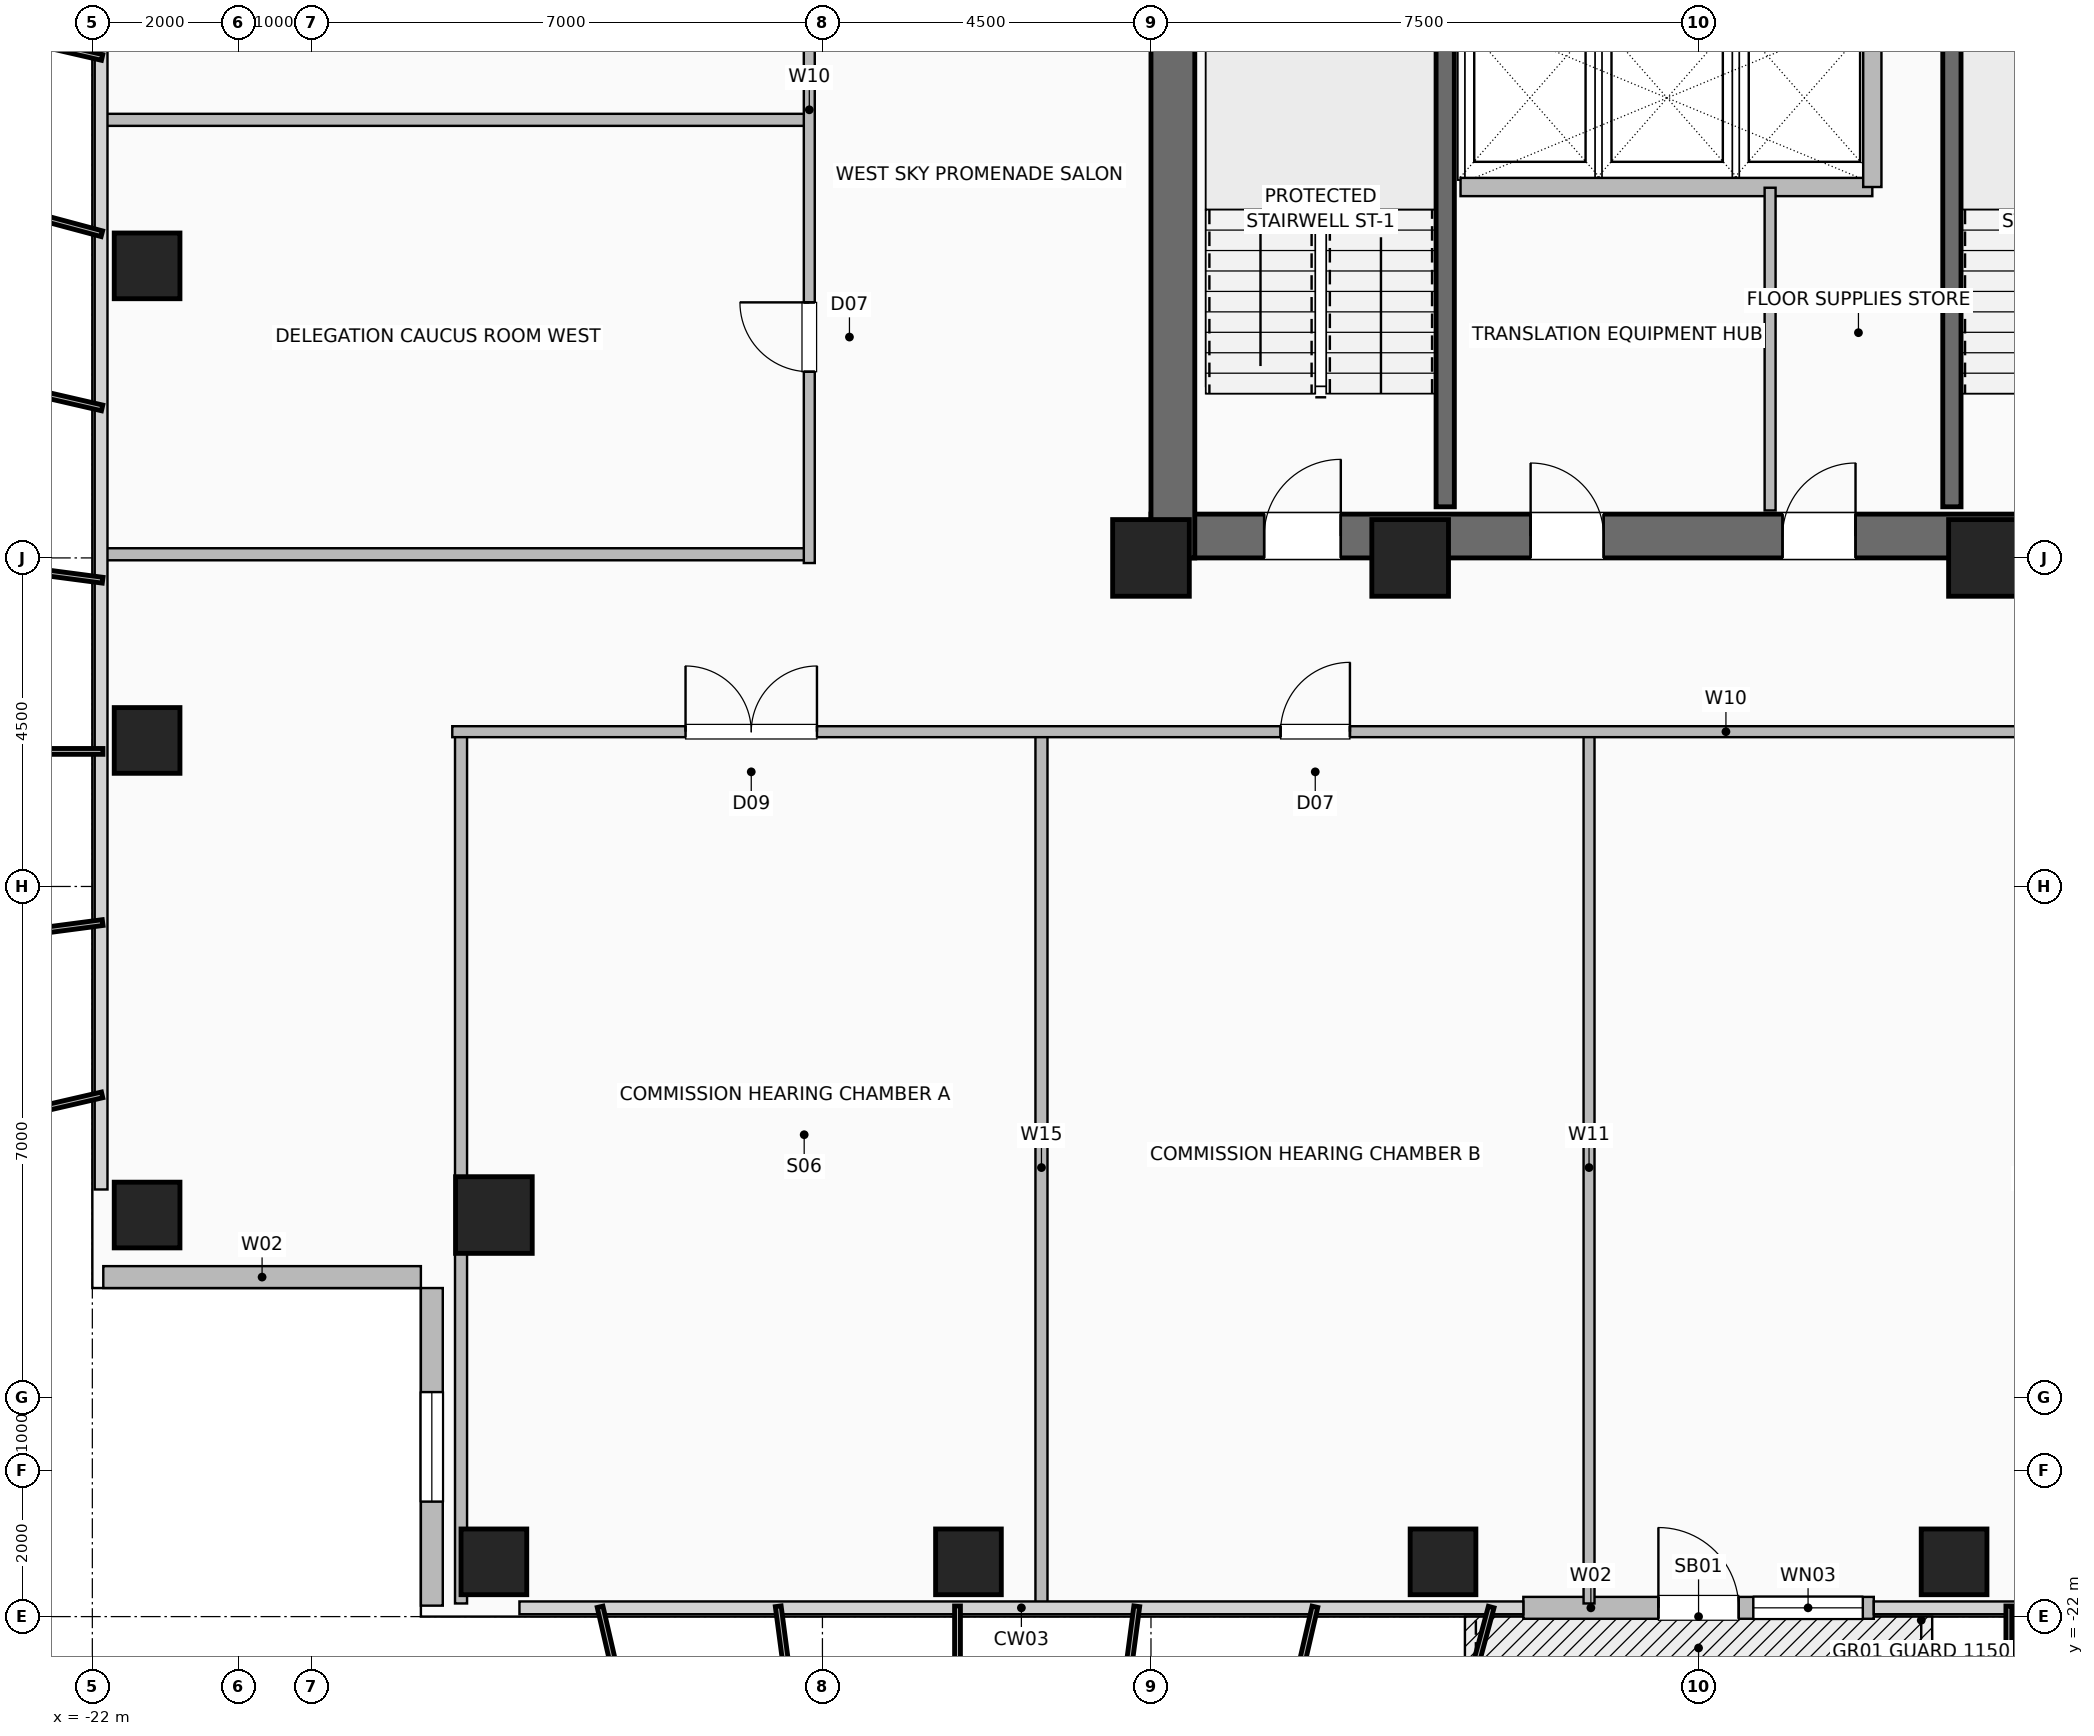
"""IFC4 building model, lengths in metres.
Left out: names, types, materials, properties, quantities, classifications, styles, units other than length and angle.
Written with IfcOpenShell. Run it as: python <this file> out.ifc"""

import sys

from ifc_helpers import new_model, si_unit, direction, frame, frame_2d, origin, origin_2d, place, context, subcontext, project, spatial, rectangle, hollow_rectangle, extrude, element, fill, save


model = new_model("IFC4")
c1 = context("Model", 3, precision=1e-05, world=origin(), true_north=direction((0.0, 1.0)))
c2 = subcontext(c1, "Body", "Model", "MODEL_VIEW")
j1 = project(units=[si_unit("LENGTHUNIT", "METRE"), si_unit("PLANEANGLEUNIT", "RADIAN")], contexts=[c1])
p1 = place(None, origin())
s1 = spatial("IfcSite", under=j1, at=p1, CompositionType="ELEMENT")
p2 = place(p1, origin())
s2 = spatial("IfcBuilding", under=s1, at=p2, CompositionType="ELEMENT")
p3 = place(p2, frame((0.0, 0.0, 104.8)))
s3 = spatial("IfcBuildingStorey", under=s2, at=p3, CompositionType="ELEMENT", Elevation=104.8)
for number, where, z_axis, x_axis in (
    (1, (-7.5, -7.5, 0.0), (0.0, 0.0, 1.0), (1.0, 0.0, 0.0)),
    (2, (-3.95, -7.5, 0.0), (0.0, 0.0, 1.0), (1.0, 0.0, 0.0)),
    (3, (3.95, -7.5, 0.0), (0.0, 0.0, 1.0), (1.0, 0.0, 0.0)),
):
    element("IfcColumn", number, at=place(p3, frame(where, z_axis=z_axis, x_axis=x_axis)), inside=s3, PredefinedType="COLUMN", context=c2, shape_type="SweptSolid", body=[
        extrude(hollow_rectangle(XDim=1.05, YDim=1.05, WallThickness=0.05, at=origin_2d()), origin(), (0.0, 0.0, 1.0), 3.6),
    ])
for number, where, z_axis, x_axis in (
    (4, (-16.5, -21.25, 0.0), (0.0, 0.0, 1.0), (1.0, 0.0, 0.0)),
    (5, (-21.25, -16.5, 0.0), (0.0, 0.0, 1.0), (1.0, 0.0, 0.0)),
    (6, (-10.0, -21.25, 0.0), (0.0, 0.0, 1.0), (1.0, 0.0, 0.0)),
    (7, (-21.25, -10.0, 0.0), (0.0, 0.0, 1.0), (1.0, 0.0, 0.0)),
    (8, (-3.5, -21.25, 0.0), (0.0, 0.0, 1.0), (1.0, 0.0, 0.0)),
    (9, (-21.25, -3.5, 0.0), (0.0, 0.0, 1.0), (1.0, 0.0, 0.0)),
    (10, (3.5, -21.25, 0.0), (0.0, 0.0, 1.0), (1.0, 0.0, 0.0)),
):
    element("IfcColumn", number, at=place(p3, frame(where, z_axis=z_axis, x_axis=x_axis)), inside=s3, PredefinedType="COLUMN", context=c2, shape_type="SweptSolid", body=[
        extrude(hollow_rectangle(XDim=0.9, YDim=0.9, WallThickness=0.045, at=origin_2d()), origin(), (0.0, 0.0, 1.0), 3.6),
    ])
p4 = place(p3, frame((-16.5, -16.5, 0.0), z_axis=(0.0, 0.0, 1.0), x_axis=(1.0, 0.0, 0.0)))
e11 = element("IfcColumn", 11, at=p4, inside=s3, PredefinedType="COLUMN", context=c2, shape_type="SweptSolid", body=[
    extrude(hollow_rectangle(XDim=1.05, YDim=1.05, WallThickness=0.05, at=origin_2d()), origin(), (0.0, 0.0, 1.0), 3.6),
])
p5 = place(p3, frame((-2.4, -21.88, 0.0), z_axis=(0.0, 0.0, 1.0), x_axis=(1.0, 0.0, 0.0)))
e12 = element("IfcWall", 12, at=p5, inside=s3, PredefinedType="SOLIDWALL", context=c2, shape_type="SweptSolid", body=[
    extrude(rectangle(XDim=4.8, YDim=0.3, at=frame_2d((2.4, 0.0))), origin(), (0.0, 0.0, 1.0), 3.36),
])
p6 = place(p5, frame((1.85, 0.0, 0.0)))
e13 = element("IfcOpeningElement", 13, at=p6, cuts=e12, PredefinedType="OPENING", context=c2, shape_type="SweptSolid", body=[
    extrude(rectangle(XDim=1.1, YDim=2.2, at=frame_2d((0.55, 1.1))), frame((0.0, 0.16, 0.0), z_axis=(0.0, -1.0, 0.0), x_axis=(1.0, 0.0, 0.0)), (0.0, 0.0, 1.0), 0.32),
])
p7 = place(p5, frame((3.15, 0.0, 0.85)))
e14 = element("IfcOpeningElement", 14, at=p7, cuts=e12, PredefinedType="OPENING", context=c2, shape_type="SweptSolid", body=[
    extrude(rectangle(XDim=1.5, YDim=1.8, at=frame_2d((0.75, 0.9))), frame((0.0, 0.16, 0.0), z_axis=(0.0, -1.0, 0.0), x_axis=(1.0, 0.0, 0.0)), (0.0, 0.0, 1.0), 0.32),
])
p8 = place(p3, frame((-17.35, -21.85, 0.0), z_axis=(0.0, 0.0, 1.0), x_axis=(0.0, 1.0, 0.0)))
e15 = element("IfcWall", 15, at=p8, inside=s3, PredefinedType="SOLIDWALL", context=c2, shape_type="SweptSolid", body=[
    extrude(rectangle(XDim=4.35, YDim=0.3, at=frame_2d((2.175, 0.0))), origin(), (0.0, 0.0, 1.0), 3.36),
])
p9 = place(p8, frame((1.425, 0.0, 0.9)))
e16 = element("IfcOpeningElement", 16, at=p9, cuts=e15, PredefinedType="OPENING", context=c2, shape_type="SweptSolid", body=[
    extrude(rectangle(XDim=1.5, YDim=1.8, at=frame_2d((0.75, 0.9))), frame((0.0, 0.16, 0.0), z_axis=(0.0, -1.0, 0.0), x_axis=(1.0, 0.0, 0.0)), (0.0, 0.0, 1.0), 0.32),
])
p10 = place(p3, frame((-21.85, -17.35, 0.0), z_axis=(0.0, 0.0, 1.0), x_axis=(1.0, 0.0, 0.0)))
e17 = element("IfcWall", 17, at=p10, inside=s3, PredefinedType="SOLIDWALL", context=c2, shape_type="SweptSolid", body=[
    extrude(rectangle(XDim=4.35, YDim=0.3, at=frame_2d((2.175, 0.0))), origin(), (0.0, 0.0, 1.0), 3.36),
])
p11 = place(p3, frame((-7.5, -7.2, 0.0), z_axis=(0.0, 0.0, 1.0), x_axis=(1.0, 0.0, 0.0)))
e18 = element("IfcWall", 18, at=p11, inside=s3, PredefinedType="SHEAR", context=c2, shape_type="SweptSolid", body=[
    extrude(rectangle(XDim=15.0, YDim=0.6, at=frame_2d((7.5, 0.0))), origin(), (0.0, 0.0, 1.0), 3.36),
])
p12 = place(p11, frame((1.55, 0.0, 0.0)))
e19 = element("IfcOpeningElement", 19, at=p12, cuts=e18, PredefinedType="OPENING", context=c2, shape_type="SweptSolid", body=[
    extrude(rectangle(XDim=1.05, YDim=2.08, at=frame_2d((0.525, 1.04))), frame((0.0, 0.31, 0.0), z_axis=(0.0, -1.0, 0.0), x_axis=(1.0, 0.0, 0.0)), (0.0, 0.0, 1.0), 0.62),
])
p13 = place(p11, frame((12.4, 0.0, 0.0)))
e20 = element("IfcOpeningElement", 20, at=p13, cuts=e18, PredefinedType="OPENING", context=c2, shape_type="SweptSolid", body=[
    extrude(rectangle(XDim=1.05, YDim=2.08, at=frame_2d((0.525, 1.04))), frame((0.0, 0.31, 0.0), z_axis=(0.0, -1.0, 0.0), x_axis=(1.0, 0.0, 0.0)), (0.0, 0.0, 1.0), 0.62),
])
p14 = place(p11, frame((5.2, 0.0, 0.0)))
e21 = element("IfcOpeningElement", 21, at=p14, cuts=e18, PredefinedType="OPENING", context=c2, shape_type="SweptSolid", body=[
    extrude(rectangle(XDim=1.0, YDim=2.08, at=frame_2d((0.5, 1.04))), frame((0.0, 0.31, 0.0), z_axis=(0.0, -1.0, 0.0), x_axis=(1.0, 0.0, 0.0)), (0.0, 0.0, 1.0), 0.62),
])
p15 = place(p11, frame((8.65, 0.0, 0.0)))
e22 = element("IfcOpeningElement", 22, at=p15, cuts=e18, PredefinedType="OPENING", context=c2, shape_type="SweptSolid", body=[
    extrude(rectangle(XDim=1.0, YDim=2.08, at=frame_2d((0.5, 1.04))), frame((0.0, 0.31, 0.0), z_axis=(0.0, -1.0, 0.0), x_axis=(1.0, 0.0, 0.0)), (0.0, 0.0, 1.0), 0.62),
])
p16 = place(p3, frame((-7.2, -7.5, 0.0), z_axis=(0.0, 0.0, 1.0), x_axis=(0.0, 1.0, 0.0)))
e23 = element("IfcWall", 23, at=p16, inside=s3, PredefinedType="SHEAR", context=c2, shape_type="SweptSolid", body=[
    extrude(rectangle(XDim=15.0, YDim=0.6, at=frame_2d((7.5, 0.0))), origin(), (0.0, 0.0, 1.0), 3.36),
])
p17 = place(p16, frame((9.5, 0.0, 0.0)))
e24 = element("IfcOpeningElement", 24, at=p17, cuts=e23, PredefinedType="OPENING", context=c2, shape_type="SweptSolid", body=[
    extrude(rectangle(XDim=1.0, YDim=2.08, at=frame_2d((0.5, 1.04))), frame((0.0, 0.31, 0.0), z_axis=(0.0, -1.0, 0.0), x_axis=(1.0, 0.0, 0.0)), (0.0, 0.0, 1.0), 0.62),
])
for number, where, z_axis, x_axis in (
    (25, (-3.47, -6.8, 0.0), (0.0, 0.0, 1.0), (0.0, 1.0, 0.0)),
    (26, (3.47, -6.8, 0.0), (0.0, 0.0, 1.0), (0.0, 1.0, 0.0)),
):
    element("IfcWall", number, at=place(p3, frame(where, z_axis=z_axis, x_axis=x_axis)), inside=s3, PredefinedType="SHEAR", context=c2, shape_type="SweptSolid", body=[
        extrude(rectangle(XDim=7.72, YDim=0.25, at=frame_2d((3.86, 0.0))), origin(), (0.0, 0.0, 1.0), 3.36),
    ])
p18 = place(p3, frame((-3.26, -2.42, 0.0), z_axis=(0.0, 0.0, 1.0), x_axis=(1.0, 0.0, 0.0)))
e27 = element("IfcWall", 27, at=p18, inside=s3, PredefinedType="SHEAR", context=c2, shape_type="SweptSolid", body=[
    extrude(rectangle(XDim=5.64, YDim=0.25, at=frame_2d((2.82, 0.0))), origin(), (0.0, 0.0, 1.0), 3.36),
])
p19 = place(p3, frame((2.38, -2.42, 0.0), z_axis=(0.0, 0.0, 1.0), x_axis=(0.0, 1.0, 0.0)))
e28 = element("IfcWall", 28, at=p19, inside=s3, PredefinedType="SHEAR", context=c2, shape_type="SweptSolid", body=[
    extrude(rectangle(XDim=2.44, YDim=0.25, at=frame_2d((1.22, 0.0))), origin(), (0.0, 0.0, 1.0), 3.36),
])
p20 = place(p3, frame((0.98, -6.85, 0.0), z_axis=(0.0, 0.0, 1.0), x_axis=(0.0, 1.0, 0.0)))
e29 = element("IfcWall", 29, at=p20, inside=s3, PredefinedType="PARTITIONING", context=c2, shape_type="SweptSolid", body=[
    extrude(rectangle(XDim=4.42, YDim=0.15, at=frame_2d((2.21, 0.0))), origin(), (0.0, 0.0, 1.0), 3.36),
])
for number, where, z_axis, x_axis in (
    (30, (-16.95, -21.82, 0.0), (0.0, 0.0, 1.0), (0.0, 1.0, 0.0)),
    (31, (-9.0, -21.82, 0.0), (0.0, 0.0, 1.0), (0.0, 1.0, 0.0)),
):
    element("IfcWall", number, at=place(p3, frame(where, z_axis=z_axis, x_axis=x_axis)), inside=s3, PredefinedType="PLUMBINGWALL", context=c2, shape_type="SweptSolid", body=[
        extrude(rectangle(XDim=11.94, YDim=0.165, at=frame_2d((5.97, 0.0))), origin(), (0.0, 0.0, 1.0), 3.36),
    ])
p21 = place(p3, frame((-1.5, -21.82, 0.0), z_axis=(0.0, 0.0, 1.0), x_axis=(0.0, 1.0, 0.0)))
e32 = element("IfcWall", 32, at=p21, inside=s3, PredefinedType="PARTITIONING", context=c2, shape_type="SweptSolid", body=[
    extrude(rectangle(XDim=11.94, YDim=0.15, at=frame_2d((5.97, 0.0))), origin(), (0.0, 0.0, 1.0), 3.36),
])
p22 = place(p3, frame((-17.07, -9.88, 0.0), z_axis=(0.0, 0.0, 1.0), x_axis=(1.0, 0.0, 0.0)))
e33 = element("IfcWall", 33, at=p22, inside=s3, PredefinedType="PARTITIONING", context=c2, shape_type="SweptSolid", body=[
    extrude(rectangle(XDim=34.14, YDim=0.15, at=frame_2d((17.07, 0.0))), origin(), (0.0, 0.0, 1.0), 3.36),
])
p23 = place(p22, frame((3.195, 0.0, 0.0)))
e34 = element("IfcOpeningElement", 34, at=p23, cuts=e33, PredefinedType="OPENING", context=c2, shape_type="SweptSolid", body=[
    extrude(rectangle(XDim=1.8, YDim=2.08, at=frame_2d((0.9, 1.04))), frame((0.0, 0.085, 0.0), z_axis=(0.0, -1.0, 0.0), x_axis=(1.0, 0.0, 0.0)), (0.0, 0.0, 1.0), 0.17),
])
p24 = place(p22, frame((11.345, 0.0, 0.0)))
e35 = element("IfcOpeningElement", 35, at=p24, cuts=e33, PredefinedType="OPENING", context=c2, shape_type="SweptSolid", body=[
    extrude(rectangle(XDim=0.95, YDim=2.06, at=frame_2d((0.475, 1.03))), frame((0.0, 0.085, 0.0), z_axis=(0.0, -1.0, 0.0), x_axis=(1.0, 0.0, 0.0)), (0.0, 0.0, 1.0), 0.17),
])
p25 = place(p22, frame((22.595, 0.0, 0.0)))
e36 = element("IfcOpeningElement", 36, at=p25, cuts=e33, PredefinedType="OPENING", context=c2, shape_type="SweptSolid", body=[
    extrude(rectangle(XDim=0.95, YDim=2.06, at=frame_2d((0.475, 1.03))), frame((0.0, 0.085, 0.0), z_axis=(0.0, -1.0, 0.0), x_axis=(1.0, 0.0, 0.0)), (0.0, 0.0, 1.0), 0.17),
])
p26 = place(p22, frame((30.925, 0.0, 0.0)))
e37 = element("IfcOpeningElement", 37, at=p26, cuts=e33, PredefinedType="OPENING", context=c2, shape_type="SweptSolid", body=[
    extrude(rectangle(XDim=0.85, YDim=2.05, at=frame_2d((0.425, 1.025))), frame((0.0, 0.085, 0.0), z_axis=(0.0, -1.0, 0.0), x_axis=(1.0, 0.0, 0.0)), (0.0, 0.0, 1.0), 0.17),
])
p27 = place(p22, frame((32.6, 0.0, 0.0)))
e38 = element("IfcOpeningElement", 38, at=p27, cuts=e33, PredefinedType="OPENING", context=c2, shape_type="SweptSolid", body=[
    extrude(rectangle(XDim=0.95, YDim=2.06, at=frame_2d((0.475, 1.03))), frame((0.0, 0.085, 0.0), z_axis=(0.0, -1.0, 0.0), x_axis=(1.0, 0.0, 0.0)), (0.0, 0.0, 1.0), 0.17),
])
for number, where, z_axis, x_axis in (
    (39, (-21.82, -7.45, 0.0), (0.0, 0.0, 1.0), (1.0, 0.0, 0.0)),
    (40, (-21.82, -1.5, 0.0), (0.0, 0.0, 1.0), (1.0, 0.0, 0.0)),
):
    element("IfcWall", number, at=place(p3, frame(where, z_axis=z_axis, x_axis=x_axis)), inside=s3, PredefinedType="PLUMBINGWALL", context=c2, shape_type="SweptSolid", body=[
        extrude(rectangle(XDim=9.64, YDim=0.165, at=frame_2d((4.82, 0.0))), origin(), (0.0, 0.0, 1.0), 3.36),
    ])
p28 = place(p3, frame((-12.18, -7.57, 0.0), z_axis=(0.0, 0.0, 1.0), x_axis=(0.0, 1.0, 0.0)))
e41 = element("IfcWall", 41, at=p28, inside=s3, PredefinedType="PARTITIONING", context=c2, shape_type="SweptSolid", body=[
    extrude(rectangle(XDim=15.14, YDim=0.15, at=frame_2d((7.57, 0.0))), origin(), (0.0, 0.0, 1.0), 3.36),
])
p29 = place(p28, frame((2.62, 0.0, 0.0)))
e42 = element("IfcOpeningElement", 42, at=p29, cuts=e41, PredefinedType="OPENING", context=c2, shape_type="SweptSolid", body=[
    extrude(rectangle(XDim=0.95, YDim=2.06, at=frame_2d((0.475, 1.03))), frame((0.0, 0.085, 0.0), z_axis=(0.0, -1.0, 0.0), x_axis=(1.0, 0.0, 0.0)), (0.0, 0.0, 1.0), 0.17),
])
p30 = place(p28, frame((8.845, 0.0, 0.0)))
e43 = element("IfcOpeningElement", 43, at=p30, cuts=e41, PredefinedType="OPENING", context=c2, shape_type="SweptSolid", body=[
    extrude(rectangle(XDim=0.95, YDim=2.06, at=frame_2d((0.475, 1.03))), frame((0.0, 0.085, 0.0), z_axis=(0.0, -1.0, 0.0), x_axis=(1.0, 0.0, 0.0)), (0.0, 0.0, 1.0), 0.17),
])
p31 = place(p28, frame((13.37, 0.0, 0.0)))
e44 = element("IfcOpeningElement", 44, at=p31, cuts=e41, PredefinedType="OPENING", context=c2, shape_type="SweptSolid", body=[
    extrude(rectangle(XDim=0.85, YDim=2.05, at=frame_2d((0.425, 1.025))), frame((0.0, 0.085, 0.0), z_axis=(0.0, -1.0, 0.0), x_axis=(1.0, 0.0, 0.0)), (0.0, 0.0, 1.0), 0.17),
])
p32 = place(p6, origin())
e45 = element("IfcDoor", 45, at=p32, inside=s3, OperationType="SINGLE_SWING_LEFT", PredefinedType="DOOR", context=c2, shape_type="SweptSolid", body=[
    extrude(rectangle(XDim=1.1, YDim=2.2, at=frame_2d((0.55, 1.1))), frame((0.0, 0.025, 0.0), z_axis=(0.0, -1.0, 0.0), x_axis=(1.0, 0.0, 0.0)), (0.0, 0.0, 1.0), 0.05),
])
fill(e13, e45)
p33 = place(p7, origin())
e46 = element("IfcWindow", 46, at=p33, inside=s3, PartitioningType="SINGLE_PANEL", PredefinedType="WINDOW", context=c2, shape_type="SweptSolid", body=[
    extrude(rectangle(XDim=1.5, YDim=1.8, at=frame_2d((0.75, 0.9))), frame((0.0, 0.03, 0.0), z_axis=(0.0, -1.0, 0.0), x_axis=(1.0, 0.0, 0.0)), (0.0, 0.0, 1.0), 0.06),
])
fill(e14, e46)
p34 = place(p9, origin())
e47 = element("IfcWindow", 47, at=p34, inside=s3, PartitioningType="SINGLE_PANEL", PredefinedType="WINDOW", context=c2, shape_type="SweptSolid", body=[
    extrude(rectangle(XDim=1.5, YDim=1.8, at=frame_2d((0.75, 0.9))), frame((0.0, 0.03, 0.0), z_axis=(0.0, -1.0, 0.0), x_axis=(1.0, 0.0, 0.0)), (0.0, 0.0, 1.0), 0.06),
])
fill(e16, e47)
p35 = place(p12, origin())
e48 = element("IfcDoor", 48, at=p35, inside=s3, OperationType="SINGLE_SWING_RIGHT", PredefinedType="DOOR", context=c2, shape_type="SweptSolid", body=[
    extrude(rectangle(XDim=1.05, YDim=2.08, at=frame_2d((0.525, 1.04))), frame((0.0, 0.025, 0.0), z_axis=(0.0, -1.0, 0.0), x_axis=(1.0, 0.0, 0.0)), (0.0, 0.0, 1.0), 0.05),
])
fill(e19, e48)
p36 = place(p14, origin())
e49 = element("IfcDoor", 49, at=p36, inside=s3, OperationType="SINGLE_SWING_LEFT", PredefinedType="DOOR", context=c2, shape_type="SweptSolid", body=[
    extrude(rectangle(XDim=1.0, YDim=2.08, at=frame_2d((0.5, 1.04))), frame((0.0, 0.025, 0.0), z_axis=(0.0, -1.0, 0.0), x_axis=(1.0, 0.0, 0.0)), (0.0, 0.0, 1.0), 0.05),
])
fill(e21, e49)
p37 = place(p15, origin())
e50 = element("IfcDoor", 50, at=p37, inside=s3, OperationType="SINGLE_SWING_RIGHT", PredefinedType="DOOR", context=c2, shape_type="SweptSolid", body=[
    extrude(rectangle(XDim=1.0, YDim=2.08, at=frame_2d((0.5, 1.04))), frame((0.0, 0.025, 0.0), z_axis=(0.0, -1.0, 0.0), x_axis=(1.0, 0.0, 0.0)), (0.0, 0.0, 1.0), 0.05),
])
fill(e22, e50)
p38 = place(p23, origin())
e51 = element("IfcDoor", 51, at=p38, inside=s3, OperationType="DOUBLE_DOOR_SINGLE_SWING", PredefinedType="DOOR", context=c2, shape_type="SweptSolid", body=[
    extrude(rectangle(XDim=1.8, YDim=2.08, at=frame_2d((0.9, 1.04))), frame((0.0, 0.025, 0.0), z_axis=(0.0, -1.0, 0.0), x_axis=(1.0, 0.0, 0.0)), (0.0, 0.0, 1.0), 0.05),
])
fill(e34, e51)
p39 = place(p24, origin())
e52 = element("IfcDoor", 52, at=p39, inside=s3, OperationType="SINGLE_SWING_RIGHT", PredefinedType="DOOR", context=c2, shape_type="SweptSolid", body=[
    extrude(rectangle(XDim=0.95, YDim=2.06, at=frame_2d((0.475, 1.03))), frame((0.0, 0.025, 0.0), z_axis=(0.0, -1.0, 0.0), x_axis=(1.0, 0.0, 0.0)), (0.0, 0.0, 1.0), 0.05),
])
fill(e35, e52)
p40 = place(p29, origin())
e53 = element("IfcDoor", 53, at=p40, inside=s3, OperationType="SINGLE_SWING_RIGHT", PredefinedType="DOOR", context=c2, shape_type="SweptSolid", body=[
    extrude(rectangle(XDim=0.95, YDim=2.06, at=frame_2d((0.475, 1.03))), frame((0.0, 0.025, 0.0), z_axis=(0.0, -1.0, 0.0), x_axis=(1.0, 0.0, 0.0)), (0.0, 0.0, 1.0), 0.05),
])
fill(e42, e53)
save(model, sys.argv[1])
